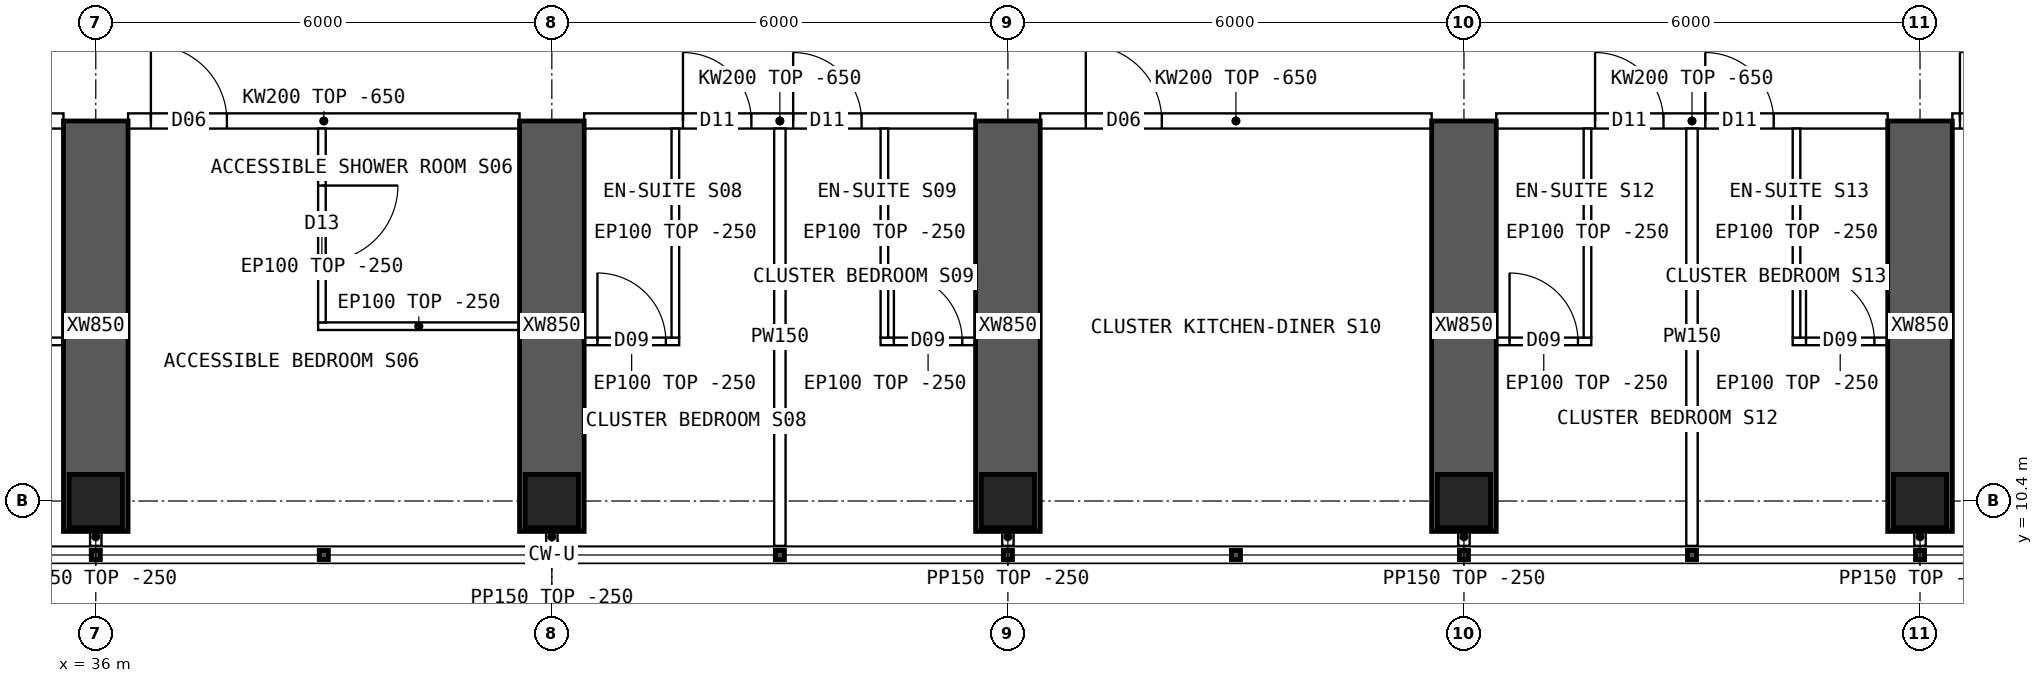
"""IFC4 building model, lengths in metres.
Left out: names, types, materials, properties, quantities, classifications, styles, units other than length and angle.
Written with IfcOpenShell. Run it as: python <this file> out.ifc"""

import sys

from ifc_helpers import new_model, si_unit, direction, frame, frame_2d, origin, origin_2d, place, context, subcontext, project, spatial, polyline, rectangle, hollow_rectangle, outline, extrude, element, fill, save


model = new_model("IFC4")
c1 = context("Model", 3, precision=1e-05, world=origin(), true_north=direction((0.0, 1.0)))
c2 = subcontext(c1, "Body", "Model", "MODEL_VIEW")
j1 = project(units=[si_unit("LENGTHUNIT", "METRE"), si_unit("PLANEANGLEUNIT", "RADIAN")], contexts=[c1])
p1 = place(None, origin())
s1 = spatial("IfcSite", under=j1, at=p1, CompositionType="ELEMENT")
p2 = place(p1, origin())
s2 = spatial("IfcBuilding", under=s1, at=p2, CompositionType="ELEMENT")
p3 = place(p2, frame((0.0, 0.0, 167.35)))
s3 = spatial("IfcBuildingStorey", under=s2, at=p3, CompositionType="ELEMENT", Elevation=167.35)
for number, where, z_axis, x_axis in (
    (1, (36.0, 10.4, 0.0), (0.0, 0.0, 1.0), (1.0, 0.0, 0.0)),
    (2, (42.0, 10.4, 0.0), (0.0, 0.0, 1.0), (1.0, 0.0, 0.0)),
    (3, (48.0, 10.4, 0.0), (0.0, 0.0, 1.0), (1.0, 0.0, 0.0)),
    (4, (54.0, 10.4, 0.0), (0.0, 0.0, 1.0), (1.0, 0.0, 0.0)),
    (5, (60.0, 10.4, 0.0), (0.0, 0.0, 1.0), (1.0, 0.0, 0.0)),
):
    element("IfcColumn", number, at=place(p3, frame(where, z_axis=z_axis, x_axis=x_axis)), inside=s3, PredefinedType="COLUMN", context=c2, shape_type="SweptSolid", body=[
        extrude(hollow_rectangle(XDim=0.7, YDim=0.7, WallThickness=0.07, at=origin_2d()), origin(), (0.0, 0.0, 1.0), 3.75),
    ])
for number, where, z_axis, x_axis in (
    (6, (36.0, 10.0, 0.0), (0.0, 0.0, 1.0), (0.0, 1.0, 0.0)),
    (7, (42.0, 10.0, 0.0), (0.0, 0.0, 1.0), (0.0, 1.0, 0.0)),
    (8, (48.0, 10.0, 0.0), (0.0, 0.0, 1.0), (0.0, 1.0, 0.0)),
    (9, (54.0, 10.0, 0.0), (0.0, 0.0, 1.0), (0.0, 1.0, 0.0)),
    (10, (60.0, 10.0, 0.0), (0.0, 0.0, 1.0), (0.0, 1.0, 0.0)),
):
    element("IfcWall", number, at=place(p3, frame(where, z_axis=z_axis, x_axis=x_axis)), inside=s3, PredefinedType="SHEAR", context=c2, shape_type="SweptSolid", body=[
        extrude(rectangle(XDim=5.4, YDim=0.85, at=frame_2d((2.7, 0.0))), origin(), (0.0, 0.0, 1.0), 3.75),
    ])
p4 = place(p3, frame((30.425, 15.4, 0.0), z_axis=(0.0, 0.0, 1.0), x_axis=(1.0, 0.0, 0.0)))
e11 = element("IfcWall", 11, at=p4, inside=s3, PredefinedType="SOLIDWALL", context=c2, shape_type="SweptSolid", body=[
    extrude(outline(polyline([(0.0, 0.0), (5.15, 0.0), (5.15, 3.1), (0.0, 3.1), (0.0, 0.0)])), frame((0.0, 0.1, 0.0), z_axis=(0.0, -1.0, 0.0), x_axis=(1.0, 0.0, 0.0)), (0.0, 0.0, 1.0), 0.2),
])
p5 = place(p4, frame((0.1, 0.0, 0.0)))
e12 = element("IfcOpeningElement", 12, at=p5, cuts=e11, PredefinedType="OPENING", context=c2, shape_type="SweptSolid", body=[
    extrude(rectangle(XDim=0.9, YDim=2.1, at=frame_2d((0.45, 1.05))), frame((0.0, 0.11, 0.0), z_axis=(0.0, -1.0, 0.0), x_axis=(1.0, 0.0, 0.0)), (0.0, 0.0, 1.0), 0.22),
])
p6 = place(p3, frame((36.425, 15.4, 0.0), z_axis=(0.0, 0.0, 1.0), x_axis=(1.0, 0.0, 0.0)))
e13 = element("IfcWall", 13, at=p6, inside=s3, PredefinedType="SOLIDWALL", context=c2, shape_type="SweptSolid", body=[
    extrude(outline(polyline([(0.0, 0.0), (5.15, 0.0), (5.15, 3.1), (0.0, 3.1), (0.0, 0.0)])), frame((0.0, 0.1, 0.0), z_axis=(0.0, -1.0, 0.0), x_axis=(1.0, 0.0, 0.0)), (0.0, 0.0, 1.0), 0.2),
])
p7 = place(p6, frame((0.3, 0.0, 0.0)))
e14 = element("IfcOpeningElement", 14, at=p7, cuts=e13, PredefinedType="OPENING", context=c2, shape_type="SweptSolid", body=[
    extrude(rectangle(XDim=1.0, YDim=2.1, at=frame_2d((0.5, 1.05))), frame((0.0, 0.11, 0.0), z_axis=(0.0, -1.0, 0.0), x_axis=(1.0, 0.0, 0.0)), (0.0, 0.0, 1.0), 0.22),
])
p8 = place(p3, frame((42.425, 15.4, 0.0), z_axis=(0.0, 0.0, 1.0), x_axis=(1.0, 0.0, 0.0)))
e15 = element("IfcWall", 15, at=p8, inside=s3, PredefinedType="SOLIDWALL", context=c2, shape_type="SweptSolid", body=[
    extrude(outline(polyline([(0.0, 0.0), (5.15, 0.0), (5.15, 3.1), (0.0, 3.1), (0.0, 0.0)])), frame((0.0, 0.1, 0.0), z_axis=(0.0, -1.0, 0.0), x_axis=(1.0, 0.0, 0.0)), (0.0, 0.0, 1.0), 0.2),
])
p9 = place(p8, frame((1.3, 0.0, 0.0)))
e16 = element("IfcOpeningElement", 16, at=p9, cuts=e15, PredefinedType="OPENING", context=c2, shape_type="SweptSolid", body=[
    extrude(rectangle(XDim=0.9, YDim=2.1, at=frame_2d((0.45, 1.05))), frame((0.0, 0.11, 0.0), z_axis=(0.0, -1.0, 0.0), x_axis=(1.0, 0.0, 0.0)), (0.0, 0.0, 1.0), 0.22),
])
p10 = place(p8, frame((2.75, 0.0, 0.0)))
e17 = element("IfcOpeningElement", 17, at=p10, cuts=e15, PredefinedType="OPENING", context=c2, shape_type="SweptSolid", body=[
    extrude(rectangle(XDim=0.9, YDim=2.1, at=frame_2d((0.45, 1.05))), frame((0.0, 0.11, 0.0), z_axis=(0.0, -1.0, 0.0), x_axis=(1.0, 0.0, 0.0)), (0.0, 0.0, 1.0), 0.22),
])
p11 = place(p3, frame((48.425, 15.4, 0.0), z_axis=(0.0, 0.0, 1.0), x_axis=(1.0, 0.0, 0.0)))
e18 = element("IfcWall", 18, at=p11, inside=s3, PredefinedType="SOLIDWALL", context=c2, shape_type="SweptSolid", body=[
    extrude(outline(polyline([(0.0, 0.0), (5.15, 0.0), (5.15, 3.1), (0.0, 3.1), (0.0, 0.0)])), frame((0.0, 0.1, 0.0), z_axis=(0.0, -1.0, 0.0), x_axis=(1.0, 0.0, 0.0)), (0.0, 0.0, 1.0), 0.2),
])
p12 = place(p11, frame((0.6, 0.0, 0.0)))
e19 = element("IfcOpeningElement", 19, at=p12, cuts=e18, PredefinedType="OPENING", context=c2, shape_type="SweptSolid", body=[
    extrude(rectangle(XDim=1.0, YDim=2.1, at=frame_2d((0.5, 1.05))), frame((0.0, 0.11, 0.0), z_axis=(0.0, -1.0, 0.0), x_axis=(1.0, 0.0, 0.0)), (0.0, 0.0, 1.0), 0.22),
])
p13 = place(p3, frame((54.425, 15.4, 0.0), z_axis=(0.0, 0.0, 1.0), x_axis=(1.0, 0.0, 0.0)))
e20 = element("IfcWall", 20, at=p13, inside=s3, PredefinedType="SOLIDWALL", context=c2, shape_type="SweptSolid", body=[
    extrude(outline(polyline([(0.0, 0.0), (5.15, 0.0), (5.15, 3.1), (0.0, 3.1), (0.0, 0.0)])), frame((0.0, 0.1, 0.0), z_axis=(0.0, -1.0, 0.0), x_axis=(1.0, 0.0, 0.0)), (0.0, 0.0, 1.0), 0.2),
])
p14 = place(p13, frame((1.3, 0.0, 0.0)))
e21 = element("IfcOpeningElement", 21, at=p14, cuts=e20, PredefinedType="OPENING", context=c2, shape_type="SweptSolid", body=[
    extrude(rectangle(XDim=0.9, YDim=2.1, at=frame_2d((0.45, 1.05))), frame((0.0, 0.11, 0.0), z_axis=(0.0, -1.0, 0.0), x_axis=(1.0, 0.0, 0.0)), (0.0, 0.0, 1.0), 0.22),
])
p15 = place(p13, frame((2.75, 0.0, 0.0)))
e22 = element("IfcOpeningElement", 22, at=p15, cuts=e20, PredefinedType="OPENING", context=c2, shape_type="SweptSolid", body=[
    extrude(rectangle(XDim=0.9, YDim=2.1, at=frame_2d((0.45, 1.05))), frame((0.0, 0.11, 0.0), z_axis=(0.0, -1.0, 0.0), x_axis=(1.0, 0.0, 0.0)), (0.0, 0.0, 1.0), 0.22),
])
p16 = place(p3, frame((60.425, 15.4, 0.0), z_axis=(0.0, 0.0, 1.0), x_axis=(1.0, 0.0, 0.0)))
e23 = element("IfcWall", 23, at=p16, inside=s3, PredefinedType="SOLIDWALL", context=c2, shape_type="SweptSolid", body=[
    extrude(outline(polyline([(0.0, 0.0), (5.15, 0.0), (5.15, 3.1), (0.0, 3.1), (0.0, 0.0)])), frame((0.0, 0.1, 0.0), z_axis=(0.0, -1.0, 0.0), x_axis=(1.0, 0.0, 0.0)), (0.0, 0.0, 1.0), 0.2),
])
p17 = place(p16, frame((0.1, 0.0, 0.0)))
e24 = element("IfcOpeningElement", 24, at=p17, cuts=e23, PredefinedType="OPENING", context=c2, shape_type="SweptSolid", body=[
    extrude(rectangle(XDim=0.9, YDim=2.1, at=frame_2d((0.45, 1.05))), frame((0.0, 0.11, 0.0), z_axis=(0.0, -1.0, 0.0), x_axis=(1.0, 0.0, 0.0)), (0.0, 0.0, 1.0), 0.22),
])
p18 = place(p3, frame((35.575, 12.5, 0.0), z_axis=(0.0, 0.0, 1.0), x_axis=(-1.0, 0.0, 0.0)))
e25 = element("IfcWall", 25, at=p18, inside=s3, PredefinedType="PARTITIONING", context=c2, shape_type="SweptSolid", body=[
    extrude(rectangle(XDim=2.55, YDim=0.1, at=frame_2d((1.275, 0.0))), origin(), (0.0, 0.0, 1.0), 3.5),
])
p19 = place(p18, frame((0.825, 0.0, 0.0)))
e26 = element("IfcOpeningElement", 26, at=p19, cuts=e25, PredefinedType="OPENING", context=c2, shape_type="SweptSolid", body=[
    extrude(rectangle(XDim=0.9, YDim=2.1, at=frame_2d((0.45, 1.05))), frame((0.0, 0.06, 0.0), z_axis=(0.0, -1.0, 0.0), x_axis=(1.0, 0.0, 0.0)), (0.0, 0.0, 1.0), 0.12),
])
p20 = place(p3, frame((38.925, 12.7, 0.0), z_axis=(0.0, 0.0, 1.0), x_axis=(1.0, 0.0, 0.0)))
e27 = element("IfcWall", 27, at=p20, inside=s3, PredefinedType="PARTITIONING", context=c2, shape_type="SweptSolid", body=[
    extrude(rectangle(XDim=2.65, YDim=0.1, at=frame_2d((1.325, 0.0))), origin(), (0.0, 0.0, 1.0), 3.5),
])
p21 = place(p3, frame((38.975, 12.75, 0.0), z_axis=(0.0, 0.0, 1.0), x_axis=(0.0, 1.0, 0.0)))
e28 = element("IfcWall", 28, at=p21, inside=s3, PredefinedType="PARTITIONING", context=c2, shape_type="SweptSolid", body=[
    extrude(outline(polyline([(0.0, 0.0), (2.55, 0.0), (2.55, 3.1), (2.502, 3.1), (2.5, 3.5), (0.0, 3.5), (0.0, 0.0)])), frame((0.0, 0.05, 0.0), z_axis=(0.0, -1.0, 0.0), x_axis=(1.0, 0.0, 0.0)), (0.0, 0.0, 1.0), 0.1),
])
p22 = place(p21, frame((0.8, 0.0, 0.0)))
e29 = element("IfcOpeningElement", 29, at=p22, cuts=e28, PredefinedType="OPENING", context=c2, shape_type="SweptSolid", body=[
    extrude(rectangle(XDim=1.0, YDim=2.1, at=frame_2d((0.5, 1.05))), frame((0.0, 0.06, 0.0), z_axis=(0.0, -1.0, 0.0), x_axis=(1.0, 0.0, 0.0)), (0.0, 0.0, 1.0), 0.12),
])
p23 = place(p3, frame((45.0, 9.81, 0.0), z_axis=(0.0, 0.0, 1.0), x_axis=(0.0, 1.0, 0.0)))
e30 = element("IfcWall", 30, at=p23, inside=s3, PredefinedType="PARTITIONING", context=c2, shape_type="SweptSolid", body=[
    extrude(outline(polyline([(0.0, 0.0), (5.49, 0.0), (5.49, 3.1), (5.442, 3.1), (5.44, 3.5), (0.792, 3.5), (0.79, 3.1), (0.392, 3.1), (0.39, 3.5), (0.0, 3.5), (0.0, 0.0)])), frame((0.0, 0.075, 0.0), z_axis=(0.0, -1.0, 0.0), x_axis=(1.0, 0.0, 0.0)), (0.0, 0.0, 1.0), 0.15),
])
p24 = place(p3, frame((43.675, 12.5, 0.0), z_axis=(0.0, 0.0, 1.0), x_axis=(-1.0, 0.0, 0.0)))
e31 = element("IfcWall", 31, at=p24, inside=s3, PredefinedType="PARTITIONING", context=c2, shape_type="SweptSolid", body=[
    extrude(rectangle(XDim=1.25, YDim=0.1, at=frame_2d((0.625, 0.0))), origin(), (0.0, 0.0, 1.0), 3.5),
])
p25 = place(p24, frame((0.175, 0.0, 0.0)))
e32 = element("IfcOpeningElement", 32, at=p25, cuts=e31, PredefinedType="OPENING", context=c2, shape_type="SweptSolid", body=[
    extrude(rectangle(XDim=0.9, YDim=2.1, at=frame_2d((0.45, 1.05))), frame((0.0, 0.06, 0.0), z_axis=(0.0, -1.0, 0.0), x_axis=(1.0, 0.0, 0.0)), (0.0, 0.0, 1.0), 0.12),
])
p26 = place(p3, frame((43.625, 12.55, 0.0), z_axis=(0.0, 0.0, 1.0), x_axis=(0.0, 1.0, 0.0)))
e33 = element("IfcWall", 33, at=p26, inside=s3, PredefinedType="PARTITIONING", context=c2, shape_type="SweptSolid", body=[
    extrude(outline(polyline([(0.0, 0.0), (2.75, 0.0), (2.75, 3.1), (2.702, 3.1), (2.7, 3.5), (0.0, 3.5), (0.0, 0.0)])), frame((0.0, 0.05, 0.0), z_axis=(0.0, -1.0, 0.0), x_axis=(1.0, 0.0, 0.0)), (0.0, 0.0, 1.0), 0.1),
])
p27 = place(p3, frame((47.575, 12.5, 0.0), z_axis=(0.0, 0.0, 1.0), x_axis=(-1.0, 0.0, 0.0)))
e34 = element("IfcWall", 34, at=p27, inside=s3, PredefinedType="PARTITIONING", context=c2, shape_type="SweptSolid", body=[
    extrude(rectangle(XDim=1.25, YDim=0.1, at=frame_2d((0.625, 0.0))), origin(), (0.0, 0.0, 1.0), 3.5),
])
p28 = place(p27, frame((0.175, 0.0, 0.0)))
e35 = element("IfcOpeningElement", 35, at=p28, cuts=e34, PredefinedType="OPENING", context=c2, shape_type="SweptSolid", body=[
    extrude(rectangle(XDim=0.9, YDim=2.1, at=frame_2d((0.45, 1.05))), frame((0.0, 0.06, 0.0), z_axis=(0.0, -1.0, 0.0), x_axis=(1.0, 0.0, 0.0)), (0.0, 0.0, 1.0), 0.12),
])
p29 = place(p3, frame((46.375, 12.55, 0.0), z_axis=(0.0, 0.0, 1.0), x_axis=(0.0, 1.0, 0.0)))
e36 = element("IfcWall", 36, at=p29, inside=s3, PredefinedType="PARTITIONING", context=c2, shape_type="SweptSolid", body=[
    extrude(outline(polyline([(0.0, 0.0), (2.75, 0.0), (2.75, 3.1), (2.702, 3.1), (2.7, 3.5), (0.0, 3.5), (0.0, 0.0)])), frame((0.0, 0.05, 0.0), z_axis=(0.0, -1.0, 0.0), x_axis=(1.0, 0.0, 0.0)), (0.0, 0.0, 1.0), 0.1),
])
p30 = place(p3, frame((57.0, 9.81, 0.0), z_axis=(0.0, 0.0, 1.0), x_axis=(0.0, 1.0, 0.0)))
e37 = element("IfcWall", 37, at=p30, inside=s3, PredefinedType="PARTITIONING", context=c2, shape_type="SweptSolid", body=[
    extrude(outline(polyline([(0.0, 0.0), (5.49, 0.0), (5.49, 3.1), (5.442, 3.1), (5.44, 3.5), (0.792, 3.5), (0.79, 3.1), (0.392, 3.1), (0.39, 3.5), (0.0, 3.5), (0.0, 0.0)])), frame((0.0, 0.075, 0.0), z_axis=(0.0, -1.0, 0.0), x_axis=(1.0, 0.0, 0.0)), (0.0, 0.0, 1.0), 0.15),
])
p31 = place(p3, frame((55.675, 12.5, 0.0), z_axis=(0.0, 0.0, 1.0), x_axis=(-1.0, 0.0, 0.0)))
e38 = element("IfcWall", 38, at=p31, inside=s3, PredefinedType="PARTITIONING", context=c2, shape_type="SweptSolid", body=[
    extrude(rectangle(XDim=1.25, YDim=0.1, at=frame_2d((0.625, 0.0))), origin(), (0.0, 0.0, 1.0), 3.5),
])
p32 = place(p31, frame((0.175, 0.0, 0.0)))
e39 = element("IfcOpeningElement", 39, at=p32, cuts=e38, PredefinedType="OPENING", context=c2, shape_type="SweptSolid", body=[
    extrude(rectangle(XDim=0.9, YDim=2.1, at=frame_2d((0.45, 1.05))), frame((0.0, 0.06, 0.0), z_axis=(0.0, -1.0, 0.0), x_axis=(1.0, 0.0, 0.0)), (0.0, 0.0, 1.0), 0.12),
])
p33 = place(p3, frame((55.625, 12.55, 0.0), z_axis=(0.0, 0.0, 1.0), x_axis=(0.0, 1.0, 0.0)))
e40 = element("IfcWall", 40, at=p33, inside=s3, PredefinedType="PARTITIONING", context=c2, shape_type="SweptSolid", body=[
    extrude(outline(polyline([(0.0, 0.0), (2.75, 0.0), (2.75, 3.1), (2.702, 3.1), (2.7, 3.5), (0.0, 3.5), (0.0, 0.0)])), frame((0.0, 0.05, 0.0), z_axis=(0.0, -1.0, 0.0), x_axis=(1.0, 0.0, 0.0)), (0.0, 0.0, 1.0), 0.1),
])
p34 = place(p3, frame((59.575, 12.5, 0.0), z_axis=(0.0, 0.0, 1.0), x_axis=(-1.0, 0.0, 0.0)))
e41 = element("IfcWall", 41, at=p34, inside=s3, PredefinedType="PARTITIONING", context=c2, shape_type="SweptSolid", body=[
    extrude(rectangle(XDim=1.25, YDim=0.1, at=frame_2d((0.625, 0.0))), origin(), (0.0, 0.0, 1.0), 3.5),
])
p35 = place(p34, frame((0.175, 0.0, 0.0)))
e42 = element("IfcOpeningElement", 42, at=p35, cuts=e41, PredefinedType="OPENING", context=c2, shape_type="SweptSolid", body=[
    extrude(rectangle(XDim=0.9, YDim=2.1, at=frame_2d((0.45, 1.05))), frame((0.0, 0.06, 0.0), z_axis=(0.0, -1.0, 0.0), x_axis=(1.0, 0.0, 0.0)), (0.0, 0.0, 1.0), 0.12),
])
p36 = place(p3, frame((58.375, 12.55, 0.0), z_axis=(0.0, 0.0, 1.0), x_axis=(0.0, 1.0, 0.0)))
e43 = element("IfcWall", 43, at=p36, inside=s3, PredefinedType="PARTITIONING", context=c2, shape_type="SweptSolid", body=[
    extrude(outline(polyline([(0.0, 0.0), (2.75, 0.0), (2.75, 3.1), (2.702, 3.1), (2.7, 3.5), (0.0, 3.5), (0.0, 0.0)])), frame((0.0, 0.05, 0.0), z_axis=(0.0, -1.0, 0.0), x_axis=(1.0, 0.0, 0.0)), (0.0, 0.0, 1.0), 0.1),
])
for number, where, z_axis, x_axis in (
    (44, (36.0, 10.05, 0.0), (0.0, 0.0, 1.0), (0.0, -1.0, 0.0)),
    (45, (42.0, 10.05, 0.0), (0.0, 0.0, 1.0), (0.0, -1.0, 0.0)),
    (46, (48.0, 10.05, 0.0), (0.0, 0.0, 1.0), (0.0, -1.0, 0.0)),
    (47, (54.0, 10.05, 0.0), (0.0, 0.0, 1.0), (0.0, -1.0, 0.0)),
    (48, (60.0, 10.05, 0.0), (0.0, 0.0, 1.0), (0.0, -1.0, 0.0)),
):
    element("IfcWall", number, at=place(p3, frame(where, z_axis=z_axis, x_axis=x_axis)), inside=s3, PredefinedType="PARTITIONING", context=c2, shape_type="SweptSolid", body=[
        extrude(rectangle(XDim=0.24, YDim=0.15, at=frame_2d((0.12, 0.0))), origin(), (0.0, 0.0, 1.0), 3.5),
    ])
p37 = place(p22, origin())
e49 = element("IfcDoor", 49, at=p37, inside=s3, OperationType="SINGLE_SWING_RIGHT", PredefinedType="DOOR", context=c2, shape_type="SweptSolid", body=[
    extrude(rectangle(XDim=1.0, YDim=2.1, at=frame_2d((0.5, 1.05))), frame((0.0, 0.025, 0.0), z_axis=(0.0, -1.0, 0.0), x_axis=(1.0, 0.0, 0.0)), (0.0, 0.0, 1.0), 0.05),
])
fill(e29, e49)
p38 = place(p7, origin())
e50 = element("IfcDoor", 50, at=p38, inside=s3, OperationType="SINGLE_SWING_LEFT", PredefinedType="DOOR", context=c2, shape_type="SweptSolid", body=[
    extrude(rectangle(XDim=1.0, YDim=2.1, at=frame_2d((0.5, 1.05))), frame((0.0, 0.025, 0.0), z_axis=(0.0, -1.0, 0.0), x_axis=(1.0, 0.0, 0.0)), (0.0, 0.0, 1.0), 0.05),
])
fill(e14, e50)
p39 = place(p25, origin())
e51 = element("IfcDoor", 51, at=p39, inside=s3, OperationType="SINGLE_SWING_RIGHT", PredefinedType="DOOR", context=c2, shape_type="SweptSolid", body=[
    extrude(rectangle(XDim=0.9, YDim=2.1, at=frame_2d((0.45, 1.05))), frame((0.0, 0.025, 0.0), z_axis=(0.0, -1.0, 0.0), x_axis=(1.0, 0.0, 0.0)), (0.0, 0.0, 1.0), 0.05),
])
fill(e32, e51)
p40 = place(p9, origin())
e52 = element("IfcDoor", 52, at=p40, inside=s3, OperationType="SINGLE_SWING_LEFT", PredefinedType="DOOR", context=c2, shape_type="SweptSolid", body=[
    extrude(rectangle(XDim=0.9, YDim=2.1, at=frame_2d((0.45, 1.05))), frame((0.0, 0.025, 0.0), z_axis=(0.0, -1.0, 0.0), x_axis=(1.0, 0.0, 0.0)), (0.0, 0.0, 1.0), 0.05),
])
fill(e16, e52)
p41 = place(p28, origin())
e53 = element("IfcDoor", 53, at=p41, inside=s3, OperationType="SINGLE_SWING_RIGHT", PredefinedType="DOOR", context=c2, shape_type="SweptSolid", body=[
    extrude(rectangle(XDim=0.9, YDim=2.1, at=frame_2d((0.45, 1.05))), frame((0.0, 0.025, 0.0), z_axis=(0.0, -1.0, 0.0), x_axis=(1.0, 0.0, 0.0)), (0.0, 0.0, 1.0), 0.05),
])
fill(e35, e53)
p42 = place(p10, origin())
e54 = element("IfcDoor", 54, at=p42, inside=s3, OperationType="SINGLE_SWING_LEFT", PredefinedType="DOOR", context=c2, shape_type="SweptSolid", body=[
    extrude(rectangle(XDim=0.9, YDim=2.1, at=frame_2d((0.45, 1.05))), frame((0.0, 0.025, 0.0), z_axis=(0.0, -1.0, 0.0), x_axis=(1.0, 0.0, 0.0)), (0.0, 0.0, 1.0), 0.05),
])
fill(e17, e54)
p43 = place(p12, origin())
e55 = element("IfcDoor", 55, at=p43, inside=s3, OperationType="SINGLE_SWING_LEFT", PredefinedType="DOOR", context=c2, shape_type="SweptSolid", body=[
    extrude(rectangle(XDim=1.0, YDim=2.1, at=frame_2d((0.5, 1.05))), frame((0.0, 0.025, 0.0), z_axis=(0.0, -1.0, 0.0), x_axis=(1.0, 0.0, 0.0)), (0.0, 0.0, 1.0), 0.05),
])
fill(e19, e55)
p44 = place(p32, origin())
e56 = element("IfcDoor", 56, at=p44, inside=s3, OperationType="SINGLE_SWING_RIGHT", PredefinedType="DOOR", context=c2, shape_type="SweptSolid", body=[
    extrude(rectangle(XDim=0.9, YDim=2.1, at=frame_2d((0.45, 1.05))), frame((0.0, 0.025, 0.0), z_axis=(0.0, -1.0, 0.0), x_axis=(1.0, 0.0, 0.0)), (0.0, 0.0, 1.0), 0.05),
])
fill(e39, e56)
p45 = place(p14, origin())
e57 = element("IfcDoor", 57, at=p45, inside=s3, OperationType="SINGLE_SWING_LEFT", PredefinedType="DOOR", context=c2, shape_type="SweptSolid", body=[
    extrude(rectangle(XDim=0.9, YDim=2.1, at=frame_2d((0.45, 1.05))), frame((0.0, 0.025, 0.0), z_axis=(0.0, -1.0, 0.0), x_axis=(1.0, 0.0, 0.0)), (0.0, 0.0, 1.0), 0.05),
])
fill(e21, e57)
p46 = place(p35, origin())
e58 = element("IfcDoor", 58, at=p46, inside=s3, OperationType="SINGLE_SWING_RIGHT", PredefinedType="DOOR", context=c2, shape_type="SweptSolid", body=[
    extrude(rectangle(XDim=0.9, YDim=2.1, at=frame_2d((0.45, 1.05))), frame((0.0, 0.025, 0.0), z_axis=(0.0, -1.0, 0.0), x_axis=(1.0, 0.0, 0.0)), (0.0, 0.0, 1.0), 0.05),
])
fill(e42, e58)
p47 = place(p15, origin())
e59 = element("IfcDoor", 59, at=p47, inside=s3, OperationType="SINGLE_SWING_LEFT", PredefinedType="DOOR", context=c2, shape_type="SweptSolid", body=[
    extrude(rectangle(XDim=0.9, YDim=2.1, at=frame_2d((0.45, 1.05))), frame((0.0, 0.025, 0.0), z_axis=(0.0, -1.0, 0.0), x_axis=(1.0, 0.0, 0.0)), (0.0, 0.0, 1.0), 0.05),
])
fill(e22, e59)
p48 = place(p17, origin())
e60 = element("IfcDoor", 60, at=p48, inside=s3, OperationType="SINGLE_SWING_LEFT", PredefinedType="DOOR", context=c2, shape_type="SweptSolid", body=[
    extrude(rectangle(XDim=0.9, YDim=2.1, at=frame_2d((0.45, 1.05))), frame((0.0, 0.025, 0.0), z_axis=(0.0, -1.0, 0.0), x_axis=(1.0, 0.0, 0.0)), (0.0, 0.0, 1.0), 0.05),
])
fill(e24, e60)
save(model, sys.argv[1])
